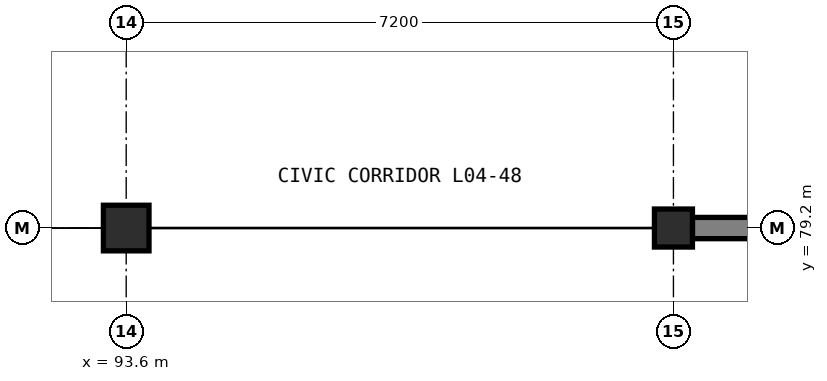
"""IFC4 building model, lengths in metres.
Left out: names, types, materials, properties, quantities, classifications, styles, units other than length and angle.
Written with IfcOpenShell. Run it as: python <this file> out.ifc"""

import sys

from ifc_helpers import new_model, si_unit, direction, frame, frame_2d, origin, origin_2d, place, context, subcontext, project, spatial, rectangle, extrude, element, save


model = new_model("IFC4")
c1 = context("Model", 3, precision=1e-05, world=origin(), true_north=direction((0.0, 1.0)))
c2 = subcontext(c1, "Body", "Model", "MODEL_VIEW")
j1 = project(units=[si_unit("LENGTHUNIT", "METRE"), si_unit("PLANEANGLEUNIT", "RADIAN")], contexts=[c1])
p1 = place(None, origin())
s1 = spatial("IfcSite", under=j1, at=p1, CompositionType="ELEMENT")
p2 = place(p1, origin())
s2 = spatial("IfcBuilding", under=s1, at=p2, CompositionType="ELEMENT")
p3 = place(p2, frame((0.0, 0.0, 14.1)))
s3 = spatial("IfcBuildingStorey", under=s2, at=p3, CompositionType="ELEMENT", Elevation=14.1)
p4 = place(p3, frame((93.6, 79.2, 0.0), z_axis=(0.0, 0.0, 1.0), x_axis=(1.0, 0.0, 0.0)))
e1 = element("IfcColumn", 1, at=p4, inside=s3, PredefinedType="COLUMN", context=c2, shape_type="SweptSolid", body=[
    extrude(rectangle(XDim=0.6, YDim=0.6, at=origin_2d()), origin(), (0.0, 0.0, 1.0), 3.9),
])
p5 = place(p3, frame((100.8, 79.2, 0.0), z_axis=(0.0, 0.0, 1.0), x_axis=(1.0, 0.0, 0.0)))
e2 = element("IfcColumn", 2, at=p5, inside=s3, PredefinedType="COLUMN", context=c2, shape_type="SweptSolid", body=[
    extrude(rectangle(XDim=0.5, YDim=0.5, at=origin_2d()), origin(), (0.0, 0.0, 1.0), 3.9),
])
p6 = place(p3, frame((107.75, 79.2, 0.0), z_axis=(0.0, 0.0, 1.0), x_axis=(-1.0, 0.0, 0.0)))
e3 = element("IfcWall", 3, at=p6, inside=s3, PredefinedType="SOLIDWALL", context=c2, shape_type="SweptSolid", body=[
    extrude(rectangle(XDim=6.7, YDim=0.28, at=frame_2d((3.35, 0.0))), origin(), (0.0, 0.0, 1.0), 3.098),
])
p7 = place(p6, frame((1.008, 0.0, 0.95)))
e4 = element("IfcOpeningElement", 4, at=p7, cuts=e3, PredefinedType="OPENING", context=c2, shape_type="SweptSolid", body=[
    extrude(rectangle(XDim=1.2, YDim=1.7, at=frame_2d((0.6, 0.85))), frame((0.0, 0.15, 0.0), z_axis=(0.0, -1.0, 0.0), x_axis=(1.0, 0.0, 0.0)), (0.0, 0.0, 1.0), 0.3),
])
p8 = place(p6, frame((4.492, 0.0, 0.95)))
e5 = element("IfcOpeningElement", 5, at=p8, cuts=e3, PredefinedType="OPENING", context=c2, shape_type="SweptSolid", body=[
    extrude(rectangle(XDim=1.2, YDim=1.7, at=frame_2d((0.6, 0.85))), frame((0.0, 0.15, 0.0), z_axis=(0.0, -1.0, 0.0), x_axis=(1.0, 0.0, 0.0)), (0.0, 0.0, 1.0), 0.3),
])
save(model, sys.argv[1])
